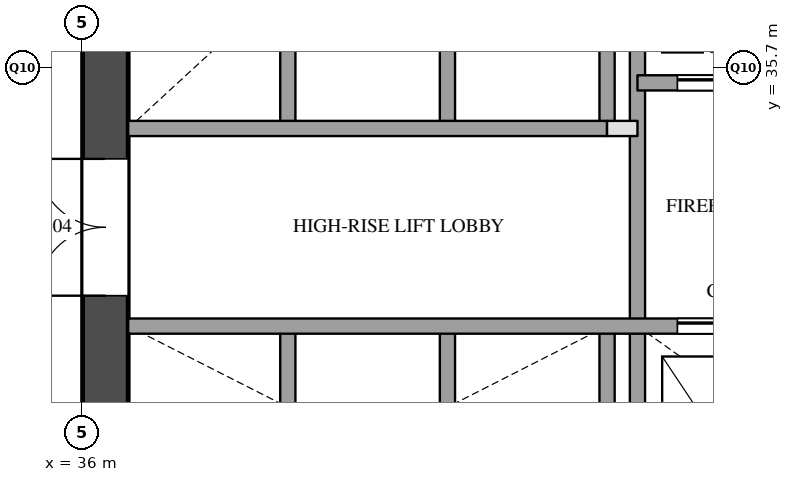
"""IFC4 building model, lengths in metres.
Left out: names, types, materials, properties, quantities, classifications, styles, units other than length and angle.
Written with IfcOpenShell. Run it as: python <this file> out.ifc"""

import sys

from ifc_helpers import new_model, si_unit, direction, frame, frame_2d, origin, place, context, subcontext, project, spatial, rectangle, extrude, element, fill, save


model = new_model("IFC4")
c1 = context("Model", 3, precision=1e-05, world=origin(), true_north=direction((0.0, 1.0)))
c2 = subcontext(c1, "Body", "Model", "MODEL_VIEW")
j1 = project(units=[si_unit("LENGTHUNIT", "METRE"), si_unit("PLANEANGLEUNIT", "RADIAN")], contexts=[c1])
p1 = place(None, origin())
s1 = spatial("IfcSite", under=j1, at=p1, CompositionType="ELEMENT")
p2 = place(p1, origin())
s2 = spatial("IfcBuilding", under=s1, at=p2, CompositionType="ELEMENT")
p3 = place(p2, frame((0.0, 0.0, 112.0)))
s3 = spatial("IfcBuildingStorey", under=s2, at=p3, CompositionType="ELEMENT", Elevation=112.0)
p4 = place(p3, frame((36.3, 29.1, 0.0), z_axis=(0.0, 0.0, 1.0), x_axis=(0.0, 1.0, 0.0)))
e1 = element("IfcWall", 1, at=p4, inside=s3, PredefinedType="SHEAR", context=c2, shape_type="SweptSolid", body=[
    extrude(rectangle(XDim=20.3, YDim=0.6, at=frame_2d((10.15, 0.0))), origin(), (0.0, 0.0, 1.0), 3.5),
])
p5 = place(p4, frame((3.6, 0.0, 0.0)))
e2 = element("IfcOpeningElement", 2, at=p5, cuts=e1, PredefinedType="OPENING", context=c2, shape_type="SweptSolid", body=[
    extrude(rectangle(XDim=1.8, YDim=2.1, at=frame_2d((0.9, 1.05))), frame((0.0, 0.31, 0.0), z_axis=(0.0, -1.0, 0.0), x_axis=(1.0, 0.0, 0.0)), (0.0, 0.0, 1.0), 0.62),
])
p6 = place(p4, frame((16.4, 0.0, 0.0)))
e3 = element("IfcOpeningElement", 3, at=p6, cuts=e1, PredefinedType="OPENING", context=c2, shape_type="SweptSolid", body=[
    extrude(rectangle(XDim=1.0, YDim=2.1, at=frame_2d((0.5, 1.05))), frame((0.0, 0.31, 0.0), z_axis=(0.0, -1.0, 0.0), x_axis=(1.0, 0.0, 0.0)), (0.0, 0.0, 1.0), 0.62),
])
p7 = place(p3, frame((38.7, 29.1, 0.0), z_axis=(0.0, 0.0, 1.0), x_axis=(0.0, 1.0, 0.0)))
e4 = element("IfcWall", 4, at=p7, inside=s3, PredefinedType="SOLIDWALL", context=c2, shape_type="SweptSolid", body=[
    extrude(rectangle(XDim=3.2, YDim=0.2, at=frame_2d((1.6, 0.0))), origin(), (0.0, 0.0, 1.0), 3.5),
])
p8 = place(p3, frame((38.7, 34.9, 0.0), z_axis=(0.0, 0.0, 1.0), x_axis=(0.0, 1.0, 0.0)))
e5 = element("IfcWall", 5, at=p8, inside=s3, PredefinedType="SOLIDWALL", context=c2, shape_type="SweptSolid", body=[
    extrude(rectangle(XDim=3.2, YDim=0.2, at=frame_2d((1.6, 0.0))), origin(), (0.0, 0.0, 1.0), 3.5),
])
p9 = place(p3, frame((40.8, 29.1, 0.0), z_axis=(0.0, 0.0, 1.0), x_axis=(0.0, 1.0, 0.0)))
e6 = element("IfcWall", 6, at=p9, inside=s3, PredefinedType="SOLIDWALL", context=c2, shape_type="SweptSolid", body=[
    extrude(rectangle(XDim=3.2, YDim=0.2, at=frame_2d((1.6, 0.0))), origin(), (0.0, 0.0, 1.0), 3.5),
])
p10 = place(p3, frame((40.8, 34.9, 0.0), z_axis=(0.0, 0.0, 1.0), x_axis=(0.0, 1.0, 0.0)))
e7 = element("IfcWall", 7, at=p10, inside=s3, PredefinedType="SOLIDWALL", context=c2, shape_type="SweptSolid", body=[
    extrude(rectangle(XDim=3.2, YDim=0.2, at=frame_2d((1.6, 0.0))), origin(), (0.0, 0.0, 1.0), 3.5),
])
p11 = place(p3, frame((42.9, 29.1, 0.0), z_axis=(0.0, 0.0, 1.0), x_axis=(0.0, 1.0, 0.0)))
e8 = element("IfcWall", 8, at=p11, inside=s3, PredefinedType="SOLIDWALL", context=c2, shape_type="SweptSolid", body=[
    extrude(rectangle(XDim=3.2, YDim=0.2, at=frame_2d((1.6, 0.0))), origin(), (0.0, 0.0, 1.0), 3.5),
])
p12 = place(p3, frame((42.9, 34.9, 0.0), z_axis=(0.0, 0.0, 1.0), x_axis=(0.0, 1.0, 0.0)))
e9 = element("IfcWall", 9, at=p12, inside=s3, PredefinedType="SOLIDWALL", context=c2, shape_type="SweptSolid", body=[
    extrude(rectangle(XDim=3.2, YDim=0.2, at=frame_2d((1.6, 0.0))), origin(), (0.0, 0.0, 1.0), 3.5),
])
p13 = place(p3, frame((43.3, 29.1, 0.0), z_axis=(0.0, 0.0, 1.0), x_axis=(0.0, 1.0, 0.0)))
e10 = element("IfcWall", 10, at=p13, inside=s3, PredefinedType="SOLIDWALL", context=c2, shape_type="SweptSolid", body=[
    extrude(rectangle(XDim=9.9, YDim=0.2, at=frame_2d((4.95, 0.0))), origin(), (0.0, 0.0, 1.0), 3.5),
])
p14 = place(p3, frame((36.6, 32.3, 0.0), z_axis=(0.0, 0.0, 1.0), x_axis=(1.0, 0.0, 0.0)))
e11 = element("IfcWall", 11, at=p14, inside=s3, PredefinedType="SOLIDWALL", context=c2, shape_type="SweptSolid", body=[
    extrude(rectangle(XDim=11.2, YDim=0.2, at=frame_2d((5.6, 0.0))), origin(), (0.0, 0.0, 1.0), 3.5),
])
p15 = place(p14, frame((7.225, 0.0, 0.0)))
e12 = element("IfcOpeningElement", 12, at=p15, cuts=e11, PredefinedType="OPENING", context=c2, shape_type="SweptSolid", body=[
    extrude(rectangle(XDim=1.2, YDim=2.1, at=frame_2d((0.6, 1.05))), frame((0.0, 0.11, 0.0), z_axis=(0.0, -1.0, 0.0), x_axis=(1.0, 0.0, 0.0)), (0.0, 0.0, 1.0), 0.22),
])
p16 = place(p14, frame((9.475, 0.0, 0.0)))
e13 = element("IfcOpeningElement", 13, at=p16, cuts=e11, PredefinedType="OPENING", context=c2, shape_type="SweptSolid", body=[
    extrude(rectangle(XDim=1.2, YDim=2.1, at=frame_2d((0.6, 1.05))), frame((0.0, 0.11, 0.0), z_axis=(0.0, -1.0, 0.0), x_axis=(1.0, 0.0, 0.0)), (0.0, 0.0, 1.0), 0.22),
])
p17 = place(p3, frame((42.9, 34.9, 0.0), z_axis=(0.0, 0.0, 1.0), x_axis=(1.0, 0.0, 0.0)))
e14 = element("IfcWall", 14, at=p17, inside=s3, PredefinedType="PARTITIONING", context=c2, shape_type="SweptSolid", body=[
    extrude(rectangle(XDim=0.4, YDim=0.2, at=frame_2d((0.2, 0.0))), origin(), (0.0, 0.0, 1.0), 3.5),
])
p18 = place(p3, frame((36.6, 34.9, 0.0), z_axis=(0.0, 0.0, 1.0), x_axis=(1.0, 0.0, 0.0)))
e15 = element("IfcWall", 15, at=p18, inside=s3, PredefinedType="SOLIDWALL", context=c2, shape_type="SweptSolid", body=[
    extrude(rectangle(XDim=6.3, YDim=0.2, at=frame_2d((3.15, 0.0))), origin(), (0.0, 0.0, 1.0), 3.5),
])
p19 = place(p3, frame((43.3, 35.5, 0.0), z_axis=(0.0, 0.0, 1.0), x_axis=(1.0, 0.0, 0.0)))
e16 = element("IfcWall", 16, at=p19, inside=s3, PredefinedType="SOLIDWALL", context=c2, shape_type="SweptSolid", body=[
    extrude(rectangle(XDim=4.5, YDim=0.2, at=frame_2d((2.25, 0.0))), origin(), (0.0, 0.0, 1.0), 3.5),
])
p20 = place(p19, frame((0.525, 0.0, 0.0)))
e17 = element("IfcOpeningElement", 17, at=p20, cuts=e16, PredefinedType="OPENING", context=c2, shape_type="SweptSolid", body=[
    extrude(rectangle(XDim=1.2, YDim=2.1, at=frame_2d((0.6, 1.05))), frame((0.0, 0.11, 0.0), z_axis=(0.0, -1.0, 0.0), x_axis=(1.0, 0.0, 0.0)), (0.0, 0.0, 1.0), 0.22),
])
p21 = place(p19, frame((3.025, 0.0, 0.0)))
e18 = element("IfcOpeningElement", 18, at=p21, cuts=e16, PredefinedType="OPENING", context=c2, shape_type="SweptSolid", body=[
    extrude(rectangle(XDim=0.7, YDim=2.1, at=frame_2d((0.35, 1.05))), frame((0.0, 0.11, 0.0), z_axis=(0.0, -1.0, 0.0), x_axis=(1.0, 0.0, 0.0)), (0.0, 0.0, 1.0), 0.22),
])
p22 = place(p15, origin())
e19 = element("IfcDoor", 19, at=p22, inside=s3, OperationType="SLIDING_TO_LEFT", PredefinedType="DOOR", context=c2, shape_type="SweptSolid", body=[
    extrude(rectangle(XDim=1.2, YDim=2.1, at=frame_2d((0.6, 1.05))), frame((0.0, 0.025, 0.0), z_axis=(0.0, -1.0, 0.0), x_axis=(1.0, 0.0, 0.0)), (0.0, 0.0, 1.0), 0.05),
])
fill(e12, e19)
p23 = place(p20, origin())
e20 = element("IfcDoor", 20, at=p23, inside=s3, OperationType="SLIDING_TO_LEFT", PredefinedType="DOOR", context=c2, shape_type="SweptSolid", body=[
    extrude(rectangle(XDim=1.2, YDim=2.1, at=frame_2d((0.6, 1.05))), frame((0.0, 0.025, 0.0), z_axis=(0.0, -1.0, 0.0), x_axis=(1.0, 0.0, 0.0)), (0.0, 0.0, 1.0), 0.05),
])
fill(e17, e20)
p24 = place(p5, origin())
e21 = element("IfcDoor", 21, at=p24, inside=s3, OperationType="DOUBLE_DOOR_SINGLE_SWING", PredefinedType="DOOR", context=c2, shape_type="SweptSolid", body=[
    extrude(rectangle(XDim=1.8, YDim=2.1, at=frame_2d((0.9, 1.05))), frame((0.0, 0.025, 0.0), z_axis=(0.0, -1.0, 0.0), x_axis=(1.0, 0.0, 0.0)), (0.0, 0.0, 1.0), 0.05),
])
fill(e2, e21)
save(model, sys.argv[1])
